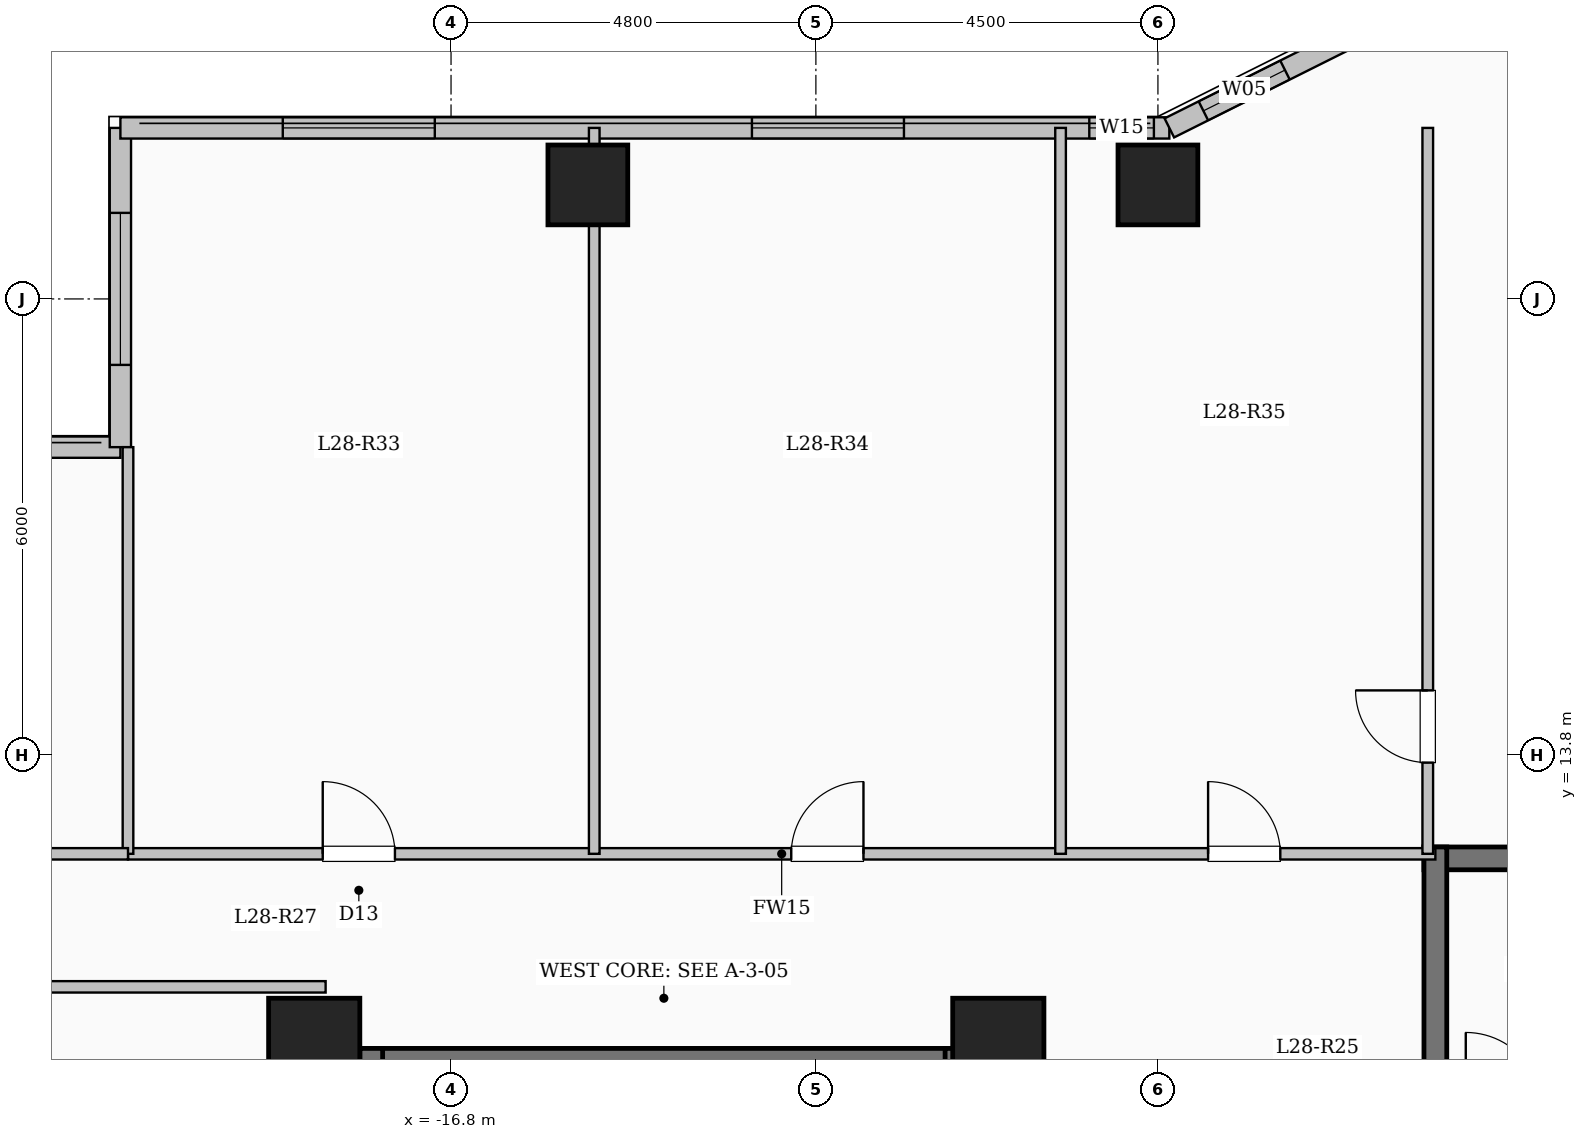
"""IFC4 building model, lengths in metres.
Left out: names, types, materials, properties, quantities, classifications, styles, units other than length and angle.
Written with IfcOpenShell. Run it as: python <this file> out.ifc"""

import sys

from ifc_helpers import new_model, si_unit, direction, frame, frame_2d, origin, origin_2d, place, context, subcontext, project, spatial, rectangle, extrude, element, fill, save


model = new_model("IFC4")
c1 = context("Model", 3, precision=1e-05, world=origin(), true_north=direction((0.0, 1.0)))
c2 = subcontext(c1, "Body", "Model", "MODEL_VIEW")
j1 = project(units=[si_unit("LENGTHUNIT", "METRE"), si_unit("PLANEANGLEUNIT", "RADIAN")], contexts=[c1])
p1 = place(None, origin())
s1 = spatial("IfcSite", under=j1, at=p1, CompositionType="ELEMENT")
p2 = place(p1, origin())
s2 = spatial("IfcBuilding", under=s1, at=p2, CompositionType="ELEMENT")
p3 = place(p2, frame((0.0, 0.0, 105.1)))
s3 = spatial("IfcBuildingStorey", under=s2, at=p3, CompositionType="ELEMENT", Elevation=105.1)
for number, where, z_axis, x_axis in (
    (1, (-9.6, 10.0, 0.0), (0.0, 0.0, 1.0), (1.0, 0.0, 0.0)),
    (2, (-18.6, 10.0, 0.0), (0.0, 0.0, 1.0), (1.0, 0.0, 0.0)),
):
    element("IfcColumn", number, at=place(p3, frame(where, z_axis=z_axis, x_axis=x_axis)), inside=s3, PredefinedType="COLUMN", context=c2, shape_type="SweptSolid", body=[
        extrude(rectangle(XDim=1.2, YDim=1.2, at=origin_2d()), origin(), (0.0, 0.0, 1.0), 3.35),
    ])
for number, where, z_axis, x_axis in (
    (3, (-15.0, 21.3, 0.0), (0.0, 0.0, 1.0), (1.0, 0.0, 0.0)),
    (4, (-7.5, 21.3, 0.0), (0.0, 0.0, 1.0), (1.0, 0.0, 0.0)),
):
    element("IfcColumn", number, at=place(p3, frame(where, z_axis=z_axis, x_axis=x_axis)), inside=s3, PredefinedType="COLUMN", context=c2, shape_type="SweptSolid", body=[
        extrude(rectangle(XDim=1.05, YDim=1.05, at=origin_2d()), origin(), (0.0, 0.0, 1.0), 3.35),
    ])
p4 = place(p3, frame((-26.85, 17.85, 0.0), z_axis=(0.0, 0.0, 1.0), x_axis=(1.0, 0.0, 0.0)))
e5 = element("IfcWall", 5, at=p4, inside=s3, PredefinedType="SOLIDWALL", context=c2, shape_type="SweptSolid", body=[
    extrude(rectangle(XDim=5.7, YDim=0.28, at=frame_2d((2.85, 0.0))), origin(), (0.0, 0.0, 1.0), 3.1),
])
p5 = place(p4, frame((1.875, 0.0, 0.9)))
e6 = element("IfcOpeningElement", 6, at=p5, cuts=e5, PredefinedType="OPENING", context=c2, shape_type="SweptSolid", body=[
    extrude(rectangle(XDim=2.0, YDim=1.7, at=frame_2d((1.0, 0.85))), frame((0.0, 0.15, 0.0), z_axis=(0.0, -1.0, 0.0), x_axis=(1.0, 0.0, 0.0)), (0.0, 0.0, 1.0), 0.3),
])
p6 = place(p3, frame((-21.15, 17.85, 0.0), z_axis=(0.0, 0.0, 1.0), x_axis=(0.0, 1.0, 0.0)))
e7 = element("IfcWall", 7, at=p6, inside=s3, PredefinedType="SOLIDWALL", context=c2, shape_type="SweptSolid", body=[
    extrude(rectangle(XDim=4.2, YDim=0.28, at=frame_2d((2.1, 0.0))), origin(), (0.0, 0.0, 1.0), 3.1),
])
p7 = place(p6, frame((1.082, 0.0, 0.9)))
e8 = element("IfcOpeningElement", 8, at=p7, cuts=e7, PredefinedType="OPENING", context=c2, shape_type="SweptSolid", body=[
    extrude(rectangle(XDim=2.0, YDim=1.7, at=frame_2d((1.0, 0.85))), frame((0.0, 0.15, 0.0), z_axis=(0.0, -1.0, 0.0), x_axis=(1.0, 0.0, 0.0)), (0.0, 0.0, 1.0), 0.3),
])
p8 = place(p3, frame((-21.15, 22.05, 0.0), z_axis=(0.0, 0.0, 1.0), x_axis=(1.0, 0.0, 0.0)))
e9 = element("IfcWall", 9, at=p8, inside=s3, PredefinedType="SOLIDWALL", context=c2, shape_type="SweptSolid", body=[
    extrude(rectangle(XDim=13.8, YDim=0.28, at=frame_2d((6.9, 0.0))), origin(), (0.0, 0.0, 1.0), 3.1),
])
p9 = place(p8, frame((2.136, 0.0, 0.9)))
e10 = element("IfcOpeningElement", 10, at=p9, cuts=e9, PredefinedType="OPENING", context=c2, shape_type="SweptSolid", body=[
    extrude(rectangle(XDim=2.0, YDim=1.7, at=frame_2d((1.0, 0.85))), frame((0.0, 0.15, 0.0), z_axis=(0.0, -1.0, 0.0), x_axis=(1.0, 0.0, 0.0)), (0.0, 0.0, 1.0), 0.3),
])
p10 = place(p8, frame((8.309, 0.0, 0.9)))
e11 = element("IfcOpeningElement", 11, at=p10, cuts=e9, PredefinedType="OPENING", context=c2, shape_type="SweptSolid", body=[
    extrude(rectangle(XDim=2.0, YDim=1.7, at=frame_2d((1.0, 0.85))), frame((0.0, 0.15, 0.0), z_axis=(0.0, -1.0, 0.0), x_axis=(1.0, 0.0, 0.0)), (0.0, 0.0, 1.0), 0.3),
])
p11 = place(p8, frame((12.747, 0.0, 0.95)))
e12 = element("IfcOpeningElement", 12, at=p11, cuts=e9, PredefinedType="OPENING", context=c2, shape_type="SweptSolid", body=[
    extrude(rectangle(XDim=0.85, YDim=1.5, at=frame_2d((0.425, 0.75))), frame((0.0, 0.15, 0.0), z_axis=(0.0, -1.0, 0.0), x_axis=(1.0, 0.0, 0.0)), (0.0, 0.0, 1.0), 0.3),
])
p12 = place(p3, frame((-7.35, 22.05, 0.0), z_axis=(0.0, 0.0, 1.0), x_axis=(0.894427191, 0.4472135955, 0.0)))
e13 = element("IfcWall", 13, at=p12, inside=s3, PredefinedType="SOLIDWALL", context=c2, shape_type="SweptSolid", body=[
    extrude(rectangle(XDim=3.354, YDim=0.28, at=frame_2d((1.677, 0.0))), origin(), (0.0, 0.0, 1.0), 3.1),
])
p13 = place(p12, frame((0.501, 0.0, 0.95)))
e14 = element("IfcOpeningElement", 14, at=p13, cuts=e13, PredefinedType="OPENING", context=c2, shape_type="SweptSolid", body=[
    extrude(rectangle(XDim=1.2, YDim=1.5, at=frame_2d((0.6, 0.75))), frame((0.0, 0.15, 0.0), z_axis=(0.0, -1.0, 0.0), x_axis=(1.0, 0.0, 0.0)), (0.0, 0.0, 1.0), 0.3),
])
p14 = place(p3, frame((-18.0, 9.79, 0.0), z_axis=(0.0, 0.0, 1.0), x_axis=(1.0, 0.0, 0.0)))
e15 = element("IfcWall", 15, at=p14, inside=s3, PredefinedType="SHEAR", context=c2, shape_type="SweptSolid", body=[
    extrude(rectangle(XDim=8.0, YDim=0.3, at=frame_2d((4.0, 0.0))), origin(), (0.0, 0.0, 1.0), 3.35),
])
for number, where, z_axis, x_axis in (
    (16, (-17.85, 6.35, 0.0), (0.0, 0.0, 1.0), (0.0, 1.0, 0.0)),
    (17, (-10.15, 6.35, 0.0), (0.0, 0.0, 1.0), (0.0, 1.0, 0.0)),
):
    element("IfcWall", number, at=place(p3, frame(where, z_axis=z_axis, x_axis=x_axis)), inside=s3, PredefinedType="SHEAR", context=c2, shape_type="SweptSolid", body=[
        extrude(rectangle(XDim=3.59, YDim=0.3, at=frame_2d((1.795, 0.0))), origin(), (0.0, 0.0, 1.0), 3.35),
    ])
p15 = place(p3, frame((-4.0, 12.44, 0.0), z_axis=(0.0, 0.0, 1.0), x_axis=(1.0, 0.0, 0.0)))
e18 = element("IfcWall", 18, at=p15, inside=s3, PredefinedType="SHEAR", context=c2, shape_type="SweptSolid", body=[
    extrude(rectangle(XDim=8.0, YDim=0.3, at=frame_2d((4.0, 0.0))), origin(), (0.0, 0.0, 1.0), 3.35),
])
p16 = place(p3, frame((-3.85, 9.0, 0.0), z_axis=(0.0, 0.0, 1.0), x_axis=(0.0, 1.0, 0.0)))
e19 = element("IfcWall", 19, at=p16, inside=s3, PredefinedType="SHEAR", context=c2, shape_type="SweptSolid", body=[
    extrude(rectangle(XDim=3.59, YDim=0.3, at=frame_2d((1.795, 0.0))), origin(), (0.0, 0.0, 1.0), 3.35),
])
p17 = place(p3, frame((-21.05, 12.5, 0.0), z_axis=(0.0, 0.0, 1.0), x_axis=(1.0, 0.0, 0.0)))
e20 = element("IfcWall", 20, at=p17, inside=s3, PredefinedType="PARTITIONING", context=c2, shape_type="SweptSolid", body=[
    extrude(rectangle(XDim=17.2, YDim=0.15, at=frame_2d((8.6, 0.0))), origin(), (0.0, 0.0, 1.0), 3.1),
])
p18 = place(p17, frame((2.562, 0.0, 0.0)))
e21 = element("IfcOpeningElement", 21, at=p18, cuts=e20, PredefinedType="OPENING", context=c2, shape_type="SweptSolid", body=[
    extrude(rectangle(XDim=0.95, YDim=2.15, at=frame_2d((0.475, 1.075))), frame((0.0, 0.085, 0.0), z_axis=(0.0, -1.0, 0.0), x_axis=(1.0, 0.0, 0.0)), (0.0, 0.0, 1.0), 0.17),
])
p19 = place(p17, frame((8.726, 0.0, 0.0)))
e22 = element("IfcOpeningElement", 22, at=p19, cuts=e20, PredefinedType="OPENING", context=c2, shape_type="SweptSolid", body=[
    extrude(rectangle(XDim=0.95, YDim=2.15, at=frame_2d((0.475, 1.075))), frame((0.0, 0.085, 0.0), z_axis=(0.0, -1.0, 0.0), x_axis=(1.0, 0.0, 0.0)), (0.0, 0.0, 1.0), 0.17),
])
p20 = place(p17, frame((14.21, 0.0, 0.0)))
e23 = element("IfcOpeningElement", 23, at=p20, cuts=e20, PredefinedType="OPENING", context=c2, shape_type="SweptSolid", body=[
    extrude(rectangle(XDim=0.95, YDim=2.15, at=frame_2d((0.475, 1.075))), frame((0.0, 0.085, 0.0), z_axis=(0.0, -1.0, 0.0), x_axis=(1.0, 0.0, 0.0)), (0.0, 0.0, 1.0), 0.17),
])
p21 = place(p3, frame((-3.95, 12.5, 0.0), z_axis=(0.0, 0.0, 1.0), x_axis=(0.0, 1.0, 0.0)))
e24 = element("IfcWall", 24, at=p21, inside=s3, PredefinedType="PARTITIONING", context=c2, shape_type="SweptSolid", body=[
    extrude(rectangle(XDim=9.55, YDim=0.14, at=frame_2d((4.775, 0.0))), origin(), (0.0, 0.0, 1.0), 3.1),
])
p22 = place(p21, frame((1.2, 0.0, 0.0)))
e25 = element("IfcOpeningElement", 25, at=p22, cuts=e24, PredefinedType="OPENING", context=c2, shape_type="SweptSolid", body=[
    extrude(rectangle(XDim=0.95, YDim=2.15, at=frame_2d((0.475, 1.075))), frame((0.0, 0.08, 0.0), z_axis=(0.0, -1.0, 0.0), x_axis=(1.0, 0.0, 0.0)), (0.0, 0.0, 1.0), 0.16),
])
p23 = place(p3, frame((-14.916, 12.5, 0.0), z_axis=(0.0, 0.0, 1.0), x_axis=(0.0, 1.0, 0.0)))
e26 = element("IfcWall", 26, at=p23, inside=s3, PredefinedType="PARTITIONING", context=c2, shape_type="SweptSolid", body=[
    extrude(rectangle(XDim=9.55, YDim=0.14, at=frame_2d((4.775, 0.0))), origin(), (0.0, 0.0, 1.0), 2.435),
])
p24 = place(p3, frame((-8.781, 12.5, 0.0), z_axis=(0.0, 0.0, 1.0), x_axis=(0.0, 1.0, 0.0)))
e27 = element("IfcWall", 27, at=p24, inside=s3, PredefinedType="PARTITIONING", context=c2, shape_type="SweptSolid", body=[
    extrude(rectangle(XDim=9.55, YDim=0.14, at=frame_2d((4.775, 0.0))), origin(), (0.0, 0.0, 1.0), 3.1),
])
p25 = place(p3, frame((-26.88, 10.75, 0.0), z_axis=(0.0, 0.0, 1.0), x_axis=(1.0, 0.0, 0.0)))
e28 = element("IfcWall", 28, at=p25, inside=s3, PredefinedType="PARTITIONING", context=c2, shape_type="SweptSolid", body=[
    extrude(rectangle(XDim=8.43, YDim=0.15, at=frame_2d((4.215, 0.0))), origin(), (0.0, 0.0, 1.0), 3.1),
])
p26 = place(p3, frame((-21.05, 12.5, 0.0), z_axis=(0.0, 0.0, 1.0), x_axis=(0.0, 1.0, 0.0)))
e29 = element("IfcWall", 29, at=p26, inside=s3, PredefinedType="PARTITIONING", context=c2, shape_type="SweptSolid", body=[
    extrude(rectangle(XDim=5.35, YDim=0.14, at=frame_2d((2.675, 0.0))), origin(), (0.0, 0.0, 1.0), 3.1),
])
p27 = place(p3, frame((-26.88, 12.5, 0.0), z_axis=(0.0, 0.0, 1.0), x_axis=(1.0, 0.0, 0.0)))
e30 = element("IfcWall", 30, at=p27, inside=s3, PredefinedType="PARTITIONING", context=c2, shape_type="SweptSolid", body=[
    extrude(rectangle(XDim=5.83, YDim=0.15, at=frame_2d((2.915, 0.0))), origin(), (0.0, 0.0, 1.0), 3.1),
])
p28 = place(p27, frame((2.44, 0.0, 0.0)))
e31 = element("IfcOpeningElement", 31, at=p28, cuts=e30, PredefinedType="OPENING", context=c2, shape_type="SweptSolid", body=[
    extrude(rectangle(XDim=0.95, YDim=2.15, at=frame_2d((0.475, 1.075))), frame((0.0, 0.085, 0.0), z_axis=(0.0, -1.0, 0.0), x_axis=(1.0, 0.0, 0.0)), (0.0, 0.0, 1.0), 0.17),
])
p29 = place(p7, origin())
e32 = element("IfcWindow", 32, at=p29, inside=s3, PartitioningType="SINGLE_PANEL", PredefinedType="WINDOW", context=c2, shape_type="SweptSolid", body=[
    extrude(rectangle(XDim=2.0, YDim=1.7, at=frame_2d((1.0, 0.85))), frame((0.0, 0.03, 0.0), z_axis=(0.0, -1.0, 0.0), x_axis=(1.0, 0.0, 0.0)), (0.0, 0.0, 1.0), 0.06),
])
fill(e8, e32)
p30 = place(p9, origin())
e33 = element("IfcWindow", 33, at=p30, inside=s3, PartitioningType="SINGLE_PANEL", PredefinedType="WINDOW", context=c2, shape_type="SweptSolid", body=[
    extrude(rectangle(XDim=2.0, YDim=1.7, at=frame_2d((1.0, 0.85))), frame((0.0, 0.03, 0.0), z_axis=(0.0, -1.0, 0.0), x_axis=(1.0, 0.0, 0.0)), (0.0, 0.0, 1.0), 0.06),
])
fill(e10, e33)
p31 = place(p10, origin())
e34 = element("IfcWindow", 34, at=p31, inside=s3, PartitioningType="SINGLE_PANEL", PredefinedType="WINDOW", context=c2, shape_type="SweptSolid", body=[
    extrude(rectangle(XDim=2.0, YDim=1.7, at=frame_2d((1.0, 0.85))), frame((0.0, 0.03, 0.0), z_axis=(0.0, -1.0, 0.0), x_axis=(1.0, 0.0, 0.0)), (0.0, 0.0, 1.0), 0.06),
])
fill(e11, e34)
p32 = place(p11, origin())
e35 = element("IfcWindow", 35, at=p32, inside=s3, PartitioningType="SINGLE_PANEL", PredefinedType="WINDOW", context=c2, shape_type="SweptSolid", body=[
    extrude(rectangle(XDim=0.85, YDim=1.5, at=frame_2d((0.425, 0.75))), frame((0.0, 0.03, 0.0), z_axis=(0.0, -1.0, 0.0), x_axis=(1.0, 0.0, 0.0)), (0.0, 0.0, 1.0), 0.06),
])
fill(e12, e35)
p33 = place(p13, origin())
e36 = element("IfcWindow", 36, at=p33, inside=s3, PartitioningType="SINGLE_PANEL", PredefinedType="WINDOW", context=c2, shape_type="SweptSolid", body=[
    extrude(rectangle(XDim=1.2, YDim=1.5, at=frame_2d((0.6, 0.75))), frame((0.0, 0.03, 0.0), z_axis=(0.0, -1.0, 0.0), x_axis=(1.0, 0.0, 0.0)), (0.0, 0.0, 1.0), 0.06),
])
fill(e14, e36)
p34 = place(p18, origin())
e37 = element("IfcDoor", 37, at=p34, inside=s3, OperationType="SINGLE_SWING_LEFT", PredefinedType="DOOR", context=c2, shape_type="SweptSolid", body=[
    extrude(rectangle(XDim=0.95, YDim=2.15, at=frame_2d((0.475, 1.075))), frame((0.0, 0.025, 0.0), z_axis=(0.0, -1.0, 0.0), x_axis=(1.0, 0.0, 0.0)), (0.0, 0.0, 1.0), 0.05),
])
fill(e21, e37)
p35 = place(p19, origin())
e38 = element("IfcDoor", 38, at=p35, inside=s3, OperationType="SINGLE_SWING_RIGHT", PredefinedType="DOOR", context=c2, shape_type="SweptSolid", body=[
    extrude(rectangle(XDim=0.95, YDim=2.15, at=frame_2d((0.475, 1.075))), frame((0.0, 0.025, 0.0), z_axis=(0.0, -1.0, 0.0), x_axis=(1.0, 0.0, 0.0)), (0.0, 0.0, 1.0), 0.05),
])
fill(e22, e38)
p36 = place(p20, origin())
e39 = element("IfcDoor", 39, at=p36, inside=s3, OperationType="SINGLE_SWING_LEFT", PredefinedType="DOOR", context=c2, shape_type="SweptSolid", body=[
    extrude(rectangle(XDim=0.95, YDim=2.15, at=frame_2d((0.475, 1.075))), frame((0.0, 0.025, 0.0), z_axis=(0.0, -1.0, 0.0), x_axis=(1.0, 0.0, 0.0)), (0.0, 0.0, 1.0), 0.05),
])
fill(e23, e39)
p37 = place(p22, origin())
e40 = element("IfcDoor", 40, at=p37, inside=s3, OperationType="SINGLE_SWING_RIGHT", PredefinedType="DOOR", context=c2, shape_type="SweptSolid", body=[
    extrude(rectangle(XDim=0.95, YDim=2.15, at=frame_2d((0.475, 1.075))), frame((0.0, 0.025, 0.0), z_axis=(0.0, -1.0, 0.0), x_axis=(1.0, 0.0, 0.0)), (0.0, 0.0, 1.0), 0.05),
])
fill(e25, e40)
save(model, sys.argv[1])
